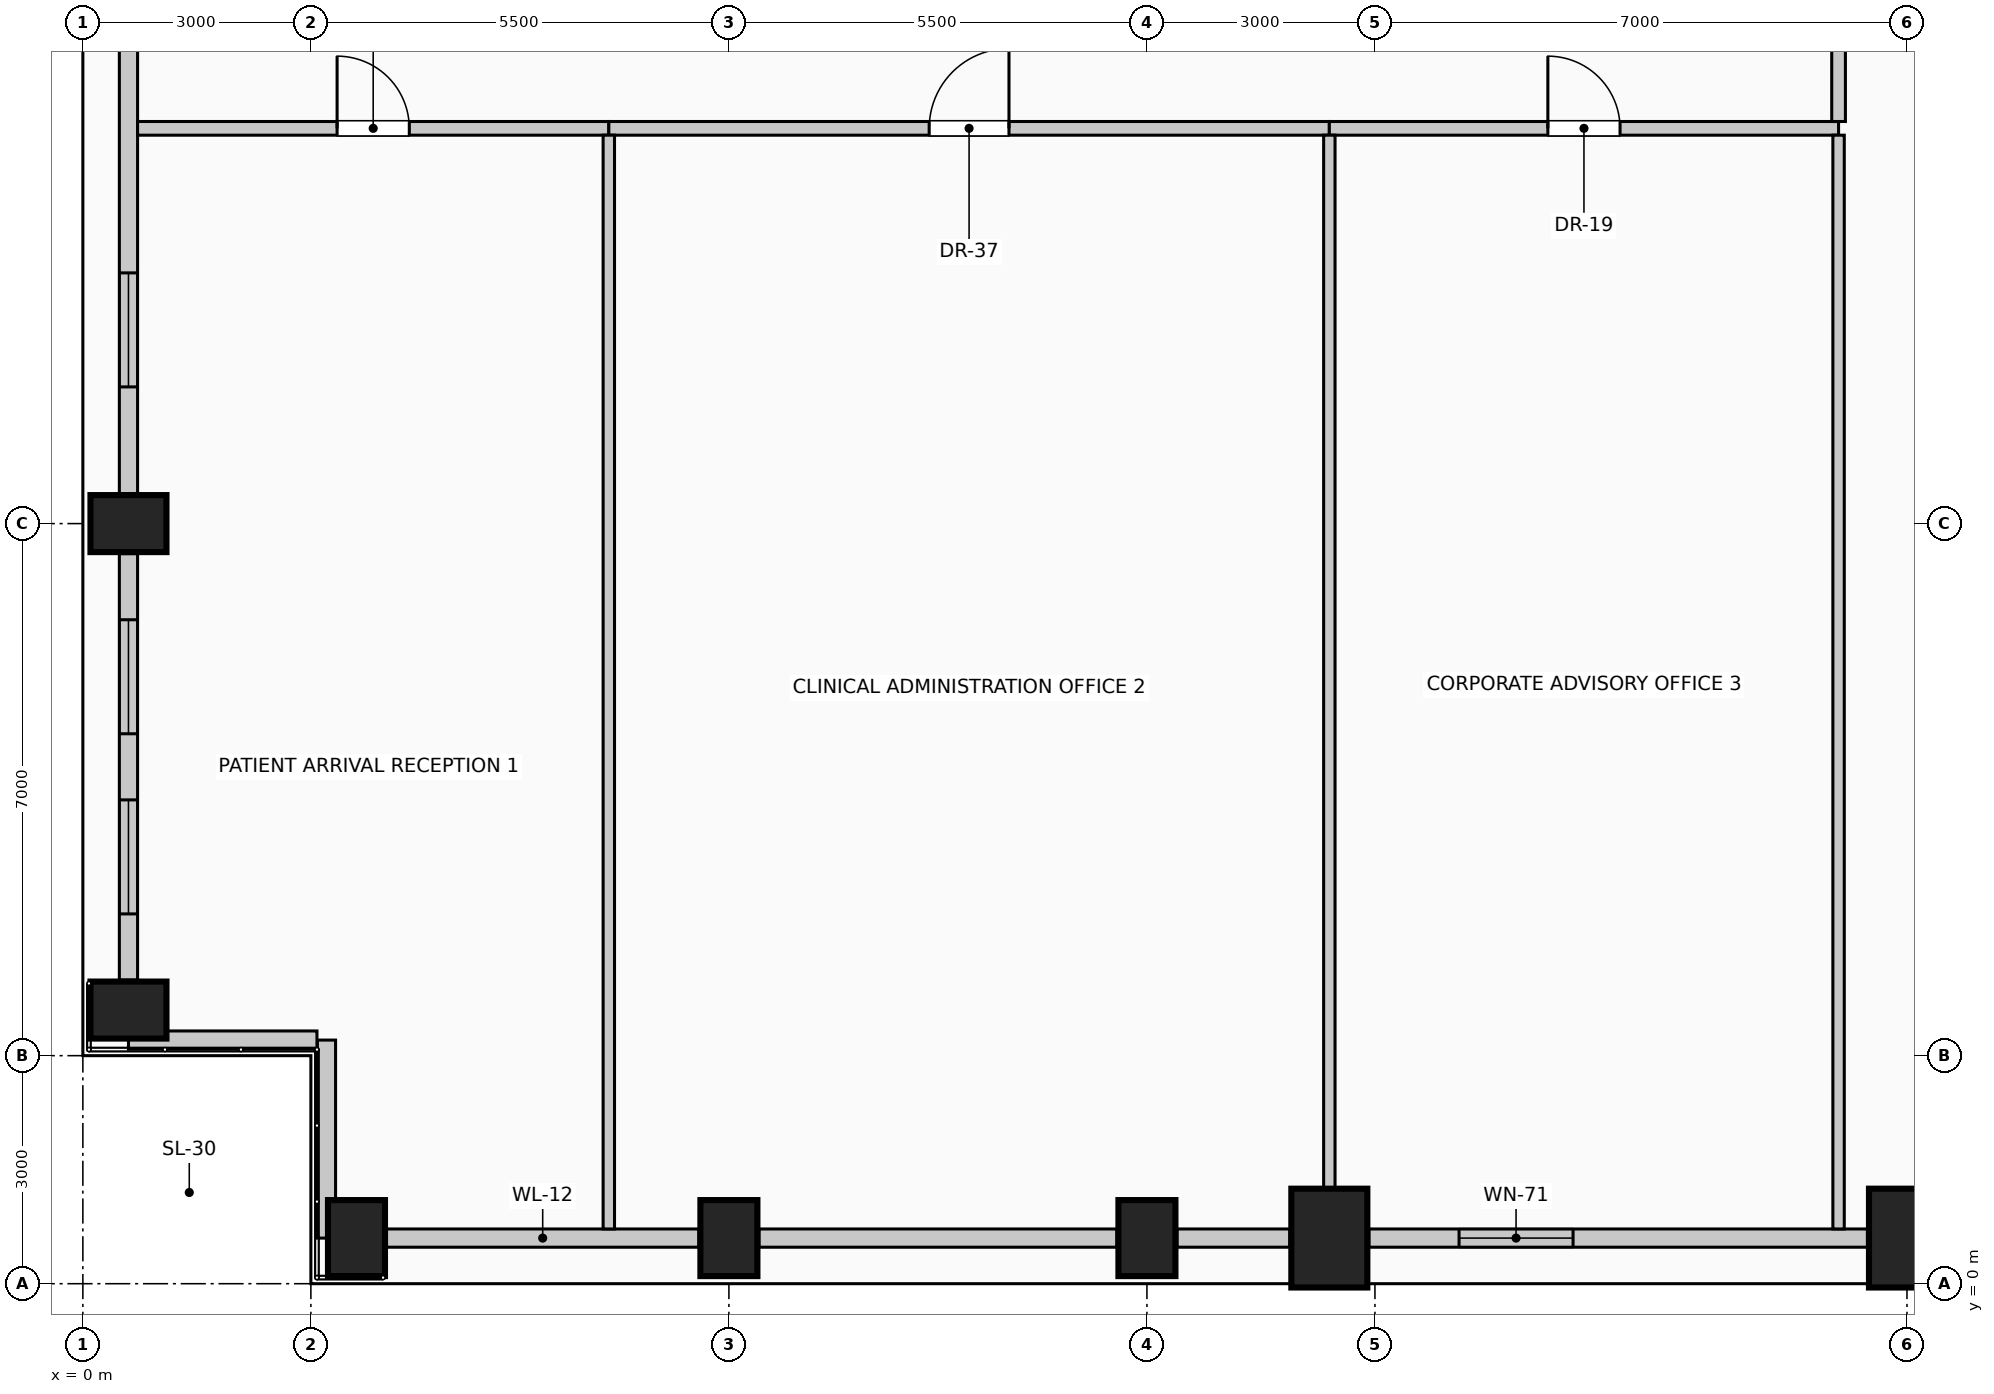
"""IFC4 building model, lengths in metres.
Left out: names, types, materials, properties, quantities, classifications, styles, units other than length and angle.
Written with IfcOpenShell. Run it as: python <this file> out.ifc"""

import sys

from ifc_helpers import new_model, si_unit, direction, frame, frame_2d, origin, origin_2d, place, context, subcontext, project, spatial, rectangle, extrude, element, fill, save


model = new_model("IFC4")
c1 = context("Model", 3, precision=1e-05, world=origin(), true_north=direction((0.0, 1.0)))
c2 = subcontext(c1, "Body", "Model", "MODEL_VIEW")
j1 = project(units=[si_unit("LENGTHUNIT", "METRE"), si_unit("PLANEANGLEUNIT", "RADIAN")], contexts=[c1])
p1 = place(None, origin())
s1 = spatial("IfcSite", under=j1, at=p1, CompositionType="ELEMENT")
p2 = place(p1, origin())
s2 = spatial("IfcBuilding", under=s1, at=p2, CompositionType="ELEMENT")
p3 = place(p2, frame((0.0, 0.0, 268.6)))
s3 = spatial("IfcBuildingStorey", under=s2, at=p3, CompositionType="ELEMENT", Elevation=268.6)
for number, where, z_axis, x_axis in (
    (1, (3.6, 0.6, 0.0), (0.0, 0.0, 1.0), (1.0, 0.0, 0.0)),
    (2, (8.5, 0.6, 0.0), (0.0, 0.0, 1.0), (1.0, 0.0, 0.0)),
    (3, (14.0, 0.6, 0.0), (0.0, 0.0, 1.0), (1.0, 0.0, 0.0)),
):
    element("IfcColumn", number, at=place(p3, frame(where, z_axis=z_axis, x_axis=x_axis)), inside=s3, PredefinedType="COLUMN", context=c2, shape_type="SweptSolid", body=[
        extrude(rectangle(XDim=0.75, YDim=1.0, at=origin_2d()), origin(), (0.0, 0.0, 1.0), 4.0),
    ])
for number, where, z_axis, x_axis in (
    (4, (16.4, 0.6, 0.0), (0.0, 0.0, 1.0), (1.0, 0.0, 0.0)),
    (5, (24.0, 0.6, 0.0), (0.0, 0.0, 1.0), (1.0, 0.0, 0.0)),
):
    element("IfcColumn", number, at=place(p3, frame(where, z_axis=z_axis, x_axis=x_axis)), inside=s3, PredefinedType="COLUMN", context=c2, shape_type="SweptSolid", body=[
        extrude(rectangle(XDim=1.0, YDim=1.3, at=origin_2d()), origin(), (0.0, 0.0, 1.0), 4.0),
    ])
for number, where, z_axis, x_axis in (
    (6, (0.6, 3.6, 0.0), (0.0, 0.0, 1.0), (0.0, 1.0, 0.0)),
    (7, (0.6, 10.0, 0.0), (0.0, 0.0, 1.0), (0.0, 1.0, 0.0)),
):
    element("IfcColumn", number, at=place(p3, frame(where, z_axis=z_axis, x_axis=x_axis)), inside=s3, PredefinedType="COLUMN", context=c2, shape_type="SweptSolid", body=[
        extrude(rectangle(XDim=0.75, YDim=1.0, at=origin_2d()), origin(), (0.0, 0.0, 1.0), 4.0),
    ])
p4 = place(p3, frame((8.105, 0.6, 0.0), z_axis=(0.0, 0.0, 1.0), x_axis=(-1.0, 0.0, 0.0)))
e8 = element("IfcWall", 8, at=p4, inside=s3, PredefinedType="SOLIDWALL", context=c2, shape_type="SweptSolid", body=[
    extrude(rectangle(XDim=4.11, YDim=0.24, at=frame_2d((2.055, 0.0))), origin(), (0.0, 0.0, 1.0), 3.0),
])
p5 = place(p3, frame((13.605, 0.6, 0.0), z_axis=(0.0, 0.0, 1.0), x_axis=(-1.0, 0.0, 0.0)))
e9 = element("IfcWall", 9, at=p5, inside=s3, PredefinedType="SOLIDWALL", context=c2, shape_type="SweptSolid", body=[
    extrude(rectangle(XDim=4.71, YDim=0.24, at=frame_2d((2.355, 0.0))), origin(), (0.0, 0.0, 1.0), 3.0),
])
p6 = place(p3, frame((15.88, 0.6, 0.0), z_axis=(0.0, 0.0, 1.0), x_axis=(-1.0, 0.0, 0.0)))
e10 = element("IfcWall", 10, at=p6, inside=s3, PredefinedType="SOLIDWALL", context=c2, shape_type="SweptSolid", body=[
    extrude(rectangle(XDim=1.485, YDim=0.24, at=frame_2d((0.742, 0.0))), origin(), (0.0, 0.0, 1.0), 3.0),
])
p7 = place(p3, frame((23.48, 0.6, 0.0), z_axis=(0.0, 0.0, 1.0), x_axis=(-1.0, 0.0, 0.0)))
e11 = element("IfcWall", 11, at=p7, inside=s3, PredefinedType="SOLIDWALL", context=c2, shape_type="SweptSolid", body=[
    extrude(rectangle(XDim=6.56, YDim=0.24, at=frame_2d((3.28, 0.0))), origin(), (0.0, 0.0, 1.0), 3.0),
])
p8 = place(p7, frame((3.873, 0.0, 0.42)))
e12 = element("IfcOpeningElement", 12, at=p8, cuts=e11, PredefinedType="OPENING", context=c2, shape_type="SweptSolid", body=[
    extrude(rectangle(XDim=1.5, YDim=2.2, at=frame_2d((0.75, 1.1))), frame((0.0, 0.13, 0.0), z_axis=(0.0, -1.0, 0.0), x_axis=(1.0, 0.0, 0.0)), (0.0, 0.0, 1.0), 0.26),
])
p9 = place(p3, frame((0.6, 3.995, 0.0), z_axis=(0.0, 0.0, 1.0), x_axis=(0.0, 1.0, 0.0)))
e13 = element("IfcWall", 13, at=p9, inside=s3, PredefinedType="SOLIDWALL", context=c2, shape_type="SweptSolid", body=[
    extrude(rectangle(XDim=5.61, YDim=0.24, at=frame_2d((2.805, 0.0))), origin(), (0.0, 0.0, 1.0), 3.0),
])
p10 = place(p9, frame((0.87, 0.0, 0.42)))
e14 = element("IfcOpeningElement", 14, at=p10, cuts=e13, PredefinedType="OPENING", context=c2, shape_type="SweptSolid", body=[
    extrude(rectangle(XDim=1.5, YDim=2.2, at=frame_2d((0.75, 1.1))), frame((0.0, 0.13, 0.0), z_axis=(0.0, -1.0, 0.0), x_axis=(1.0, 0.0, 0.0)), (0.0, 0.0, 1.0), 0.26),
])
p11 = place(p9, frame((3.24, 0.0, 0.42)))
e15 = element("IfcOpeningElement", 15, at=p11, cuts=e13, PredefinedType="OPENING", context=c2, shape_type="SweptSolid", body=[
    extrude(rectangle(XDim=1.5, YDim=2.2, at=frame_2d((0.75, 1.1))), frame((0.0, 0.13, 0.0), z_axis=(0.0, -1.0, 0.0), x_axis=(1.0, 0.0, 0.0)), (0.0, 0.0, 1.0), 0.26),
])
p12 = place(p3, frame((0.6, 10.395, 0.0), z_axis=(0.0, 0.0, 1.0), x_axis=(0.0, 1.0, 0.0)))
e16 = element("IfcWall", 16, at=p12, inside=s3, PredefinedType="SOLIDWALL", context=c2, shape_type="SweptSolid", body=[
    extrude(rectangle(XDim=7.21, YDim=0.24, at=frame_2d((3.605, 0.0))), origin(), (0.0, 0.0, 1.0), 3.0),
])
p13 = place(p12, frame((1.403, 0.0, 0.42)))
e17 = element("IfcOpeningElement", 17, at=p13, cuts=e16, PredefinedType="OPENING", context=c2, shape_type="SweptSolid", body=[
    extrude(rectangle(XDim=1.5, YDim=2.2, at=frame_2d((0.75, 1.1))), frame((0.0, 0.13, 0.0), z_axis=(0.0, -1.0, 0.0), x_axis=(1.0, 0.0, 0.0)), (0.0, 0.0, 1.0), 0.26),
])
p14 = place(p3, frame((3.205, 0.6, 0.0), z_axis=(0.0, 0.0, 1.0), x_axis=(0.0, 1.0, 0.0)))
e18 = element("IfcWall", 18, at=p14, inside=s3, PredefinedType="SOLIDWALL", context=c2, shape_type="SweptSolid", body=[
    extrude(rectangle(XDim=2.605, YDim=0.24, at=frame_2d((1.302, 0.0))), origin(), (0.0, 0.0, 1.0), 3.75),
])
p15 = place(p3, frame((3.08, 3.205, 0.0), z_axis=(0.0, 0.0, 1.0), x_axis=(-1.0, 0.0, 0.0)))
e19 = element("IfcWall", 19, at=p15, inside=s3, PredefinedType="SOLIDWALL", context=c2, shape_type="SweptSolid", body=[
    extrude(rectangle(XDim=2.48, YDim=0.24, at=frame_2d((1.24, 0.0))), origin(), (0.0, 0.0, 1.0), 3.75),
])
p16 = place(p3, frame((0.72, 15.2, 0.0), z_axis=(0.0, 0.0, 1.0), x_axis=(1.0, 0.0, 0.0)))
e20 = element("IfcWall", 20, at=p16, inside=s3, PredefinedType="PARTITIONING", context=c2, shape_type="SweptSolid", body=[
    extrude(rectangle(XDim=6.2, YDim=0.18, at=frame_2d((3.1, 0.0))), origin(), (0.0, 0.0, 1.0), 3.75),
])
p17 = place(p16, frame((2.625, 0.0, 0.0)))
e21 = element("IfcOpeningElement", 21, at=p17, cuts=e20, PredefinedType="OPENING", context=c2, shape_type="SweptSolid", body=[
    extrude(rectangle(XDim=0.95, YDim=2.15, at=frame_2d((0.475, 1.075))), frame((0.0, 0.1, 0.0), z_axis=(0.0, -1.0, 0.0), x_axis=(1.0, 0.0, 0.0)), (0.0, 0.0, 1.0), 0.2),
])
p18 = place(p3, frame((6.92, 15.2, 0.0), z_axis=(0.0, 0.0, 1.0), x_axis=(1.0, 0.0, 0.0)))
e22 = element("IfcWall", 22, at=p18, inside=s3, PredefinedType="PARTITIONING", context=c2, shape_type="SweptSolid", body=[
    extrude(rectangle(XDim=9.48, YDim=0.18, at=frame_2d((4.74, 0.0))), origin(), (0.0, 0.0, 1.0), 3.75),
])
p19 = place(p18, frame((4.215, 0.0, 0.0)))
e23 = element("IfcOpeningElement", 23, at=p19, cuts=e22, PredefinedType="OPENING", context=c2, shape_type="SweptSolid", body=[
    extrude(rectangle(XDim=1.05, YDim=2.15, at=frame_2d((0.525, 1.075))), frame((0.0, 0.1, 0.0), z_axis=(0.0, -1.0, 0.0), x_axis=(1.0, 0.0, 0.0)), (0.0, 0.0, 1.0), 0.2),
])
p20 = place(p3, frame((16.4, 15.2, 0.0), z_axis=(0.0, 0.0, 1.0), x_axis=(1.0, 0.0, 0.0)))
e24 = element("IfcWall", 24, at=p20, inside=s3, PredefinedType="PARTITIONING", context=c2, shape_type="SweptSolid", body=[
    extrude(rectangle(XDim=6.7, YDim=0.18, at=frame_2d((3.35, 0.0))), origin(), (0.0, 0.0, 1.0), 3.75),
])
p21 = place(p20, frame((2.875, 0.0, 0.0)))
e25 = element("IfcOpeningElement", 25, at=p21, cuts=e24, PredefinedType="OPENING", context=c2, shape_type="SweptSolid", body=[
    extrude(rectangle(XDim=0.95, YDim=2.15, at=frame_2d((0.475, 1.075))), frame((0.0, 0.1, 0.0), z_axis=(0.0, -1.0, 0.0), x_axis=(1.0, 0.0, 0.0)), (0.0, 0.0, 1.0), 0.2),
])
p22 = place(p3, frame((6.92, 0.72, 0.0), z_axis=(0.0, 0.0, 1.0), x_axis=(0.0, 1.0, 0.0)))
e26 = element("IfcWall", 26, at=p22, inside=s3, PredefinedType="PARTITIONING", context=c2, shape_type="SweptSolid", body=[
    extrude(rectangle(XDim=14.39, YDim=0.15, at=frame_2d((7.195, 0.0))), origin(), (0.0, 0.0, 1.0), 3.75),
])
p23 = place(p3, frame((16.4, 1.25, 0.0), z_axis=(0.0, 0.0, 1.0), x_axis=(0.0, 1.0, 0.0)))
e27 = element("IfcWall", 27, at=p23, inside=s3, PredefinedType="PARTITIONING", context=c2, shape_type="SweptSolid", body=[
    extrude(rectangle(XDim=13.86, YDim=0.15, at=frame_2d((6.93, 0.0))), origin(), (0.0, 0.0, 1.0), 3.195),
])
p24 = place(p3, frame((23.1, 0.72, 0.0), z_axis=(0.0, 0.0, 1.0), x_axis=(0.0, 1.0, 0.0)))
e28 = element("IfcWall", 28, at=p24, inside=s3, PredefinedType="PARTITIONING", context=c2, shape_type="SweptSolid", body=[
    extrude(rectangle(XDim=14.39, YDim=0.15, at=frame_2d((7.195, 0.0))), origin(), (0.0, 0.0, 1.0), 3.75),
])
p25 = place(p3, frame((23.1, 15.29, 0.0), z_axis=(0.0, 0.0, 1.0), x_axis=(0.0, 1.0, 0.0)))
e29 = element("IfcWall", 29, at=p25, inside=s3, PredefinedType="PARTITIONING", context=c2, shape_type="SweptSolid", body=[
    extrude(rectangle(XDim=2.01, YDim=0.18, at=frame_2d((1.005, 0.0))), origin(), (0.0, 0.0, 1.0), 3.75),
])
p26 = place(p8, origin())
e30 = element("IfcWindow", 30, at=p26, inside=s3, PartitioningType="SINGLE_PANEL", PredefinedType="WINDOW", context=c2, shape_type="SweptSolid", body=[
    extrude(rectangle(XDim=1.5, YDim=2.2, at=frame_2d((0.75, 1.1))), frame((0.0, 0.03, 0.0), z_axis=(0.0, -1.0, 0.0), x_axis=(1.0, 0.0, 0.0)), (0.0, 0.0, 1.0), 0.06),
])
fill(e12, e30)
p27 = place(p10, origin())
e31 = element("IfcWindow", 31, at=p27, inside=s3, PartitioningType="SINGLE_PANEL", PredefinedType="WINDOW", context=c2, shape_type="SweptSolid", body=[
    extrude(rectangle(XDim=1.5, YDim=2.2, at=frame_2d((0.75, 1.1))), frame((0.0, 0.03, 0.0), z_axis=(0.0, -1.0, 0.0), x_axis=(1.0, 0.0, 0.0)), (0.0, 0.0, 1.0), 0.06),
])
fill(e14, e31)
p28 = place(p11, origin())
e32 = element("IfcWindow", 32, at=p28, inside=s3, PartitioningType="SINGLE_PANEL", PredefinedType="WINDOW", context=c2, shape_type="SweptSolid", body=[
    extrude(rectangle(XDim=1.5, YDim=2.2, at=frame_2d((0.75, 1.1))), frame((0.0, 0.03, 0.0), z_axis=(0.0, -1.0, 0.0), x_axis=(1.0, 0.0, 0.0)), (0.0, 0.0, 1.0), 0.06),
])
fill(e15, e32)
p29 = place(p13, origin())
e33 = element("IfcWindow", 33, at=p29, inside=s3, PartitioningType="SINGLE_PANEL", PredefinedType="WINDOW", context=c2, shape_type="SweptSolid", body=[
    extrude(rectangle(XDim=1.5, YDim=2.2, at=frame_2d((0.75, 1.1))), frame((0.0, 0.03, 0.0), z_axis=(0.0, -1.0, 0.0), x_axis=(1.0, 0.0, 0.0)), (0.0, 0.0, 1.0), 0.06),
])
fill(e17, e33)
p30 = place(p17, origin())
e34 = element("IfcDoor", 34, at=p30, inside=s3, OperationType="SINGLE_SWING_LEFT", PredefinedType="DOOR", context=c2, shape_type="SweptSolid", body=[
    extrude(rectangle(XDim=0.95, YDim=2.15, at=frame_2d((0.475, 1.075))), frame((0.0, 0.025, 0.0), z_axis=(0.0, -1.0, 0.0), x_axis=(1.0, 0.0, 0.0)), (0.0, 0.0, 1.0), 0.05),
])
fill(e21, e34)
p31 = place(p19, origin())
e35 = element("IfcDoor", 35, at=p31, inside=s3, OperationType="SINGLE_SWING_RIGHT", PredefinedType="DOOR", context=c2, shape_type="SweptSolid", body=[
    extrude(rectangle(XDim=1.05, YDim=2.15, at=frame_2d((0.525, 1.075))), frame((0.0, 0.025, 0.0), z_axis=(0.0, -1.0, 0.0), x_axis=(1.0, 0.0, 0.0)), (0.0, 0.0, 1.0), 0.05),
])
fill(e23, e35)
p32 = place(p21, origin())
e36 = element("IfcDoor", 36, at=p32, inside=s3, OperationType="SINGLE_SWING_LEFT", PredefinedType="DOOR", context=c2, shape_type="SweptSolid", body=[
    extrude(rectangle(XDim=0.95, YDim=2.15, at=frame_2d((0.475, 1.075))), frame((0.0, 0.025, 0.0), z_axis=(0.0, -1.0, 0.0), x_axis=(1.0, 0.0, 0.0)), (0.0, 0.0, 1.0), 0.05),
])
fill(e25, e36)
save(model, sys.argv[1])
